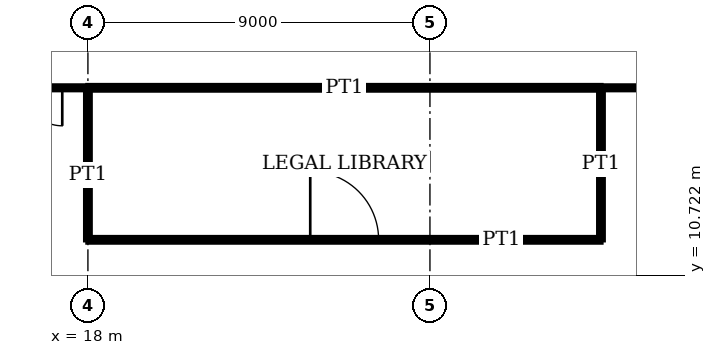
"""IFC4 building model, lengths in metres.
Left out: names, types, materials, properties, quantities, classifications, styles, units other than length and angle.
Written with IfcOpenShell. Run it as: python <this file> out.ifc"""

import sys

from ifc_helpers import new_model, si_unit, direction, frame, frame_2d, origin, place, context, subcontext, project, spatial, rectangle, extrude, element, fill, save


model = new_model("IFC4")
c1 = context("Model", 3, precision=1e-05, world=origin(), true_north=direction((0.0, 1.0)))
c2 = subcontext(c1, "Body", "Model", "MODEL_VIEW")
j1 = project(units=[si_unit("LENGTHUNIT", "METRE"), si_unit("PLANEANGLEUNIT", "RADIAN")], contexts=[c1])
p1 = place(None, origin())
s1 = spatial("IfcSite", under=j1, at=p1, CompositionType="ELEMENT")
p2 = place(p1, origin())
s2 = spatial("IfcBuilding", under=s1, at=p2, CompositionType="ELEMENT")
p3 = place(p2, frame((0.0, 0.0, 71.8)))
s3 = spatial("IfcBuildingStorey", under=s2, at=p3, CompositionType="ELEMENT", Elevation=71.8)
p4 = place(p3, frame((18.0, 11.65, 0.0), z_axis=(0.0, 0.0, 1.0), x_axis=(1.0, 0.0, 0.0)))
e1 = element("IfcWall", 1, at=p4, inside=s3, PredefinedType="PARTITIONING", context=c2, shape_type="SweptSolid", body=[
    extrude(rectangle(XDim=13.5, YDim=0.12, at=frame_2d((6.75, 0.0))), origin(), (0.0, 0.0, 1.0), 3.75),
])
p5 = place(p4, frame((5.85, 0.0, 0.0)))
e2 = element("IfcOpeningElement", 2, at=p5, cuts=e1, PredefinedType="OPENING", context=c2, shape_type="SweptSolid", body=[
    extrude(rectangle(XDim=1.8, YDim=2.4, at=frame_2d((0.9, 1.2))), frame((0.0, 0.07, 0.0), z_axis=(0.0, -1.0, 0.0), x_axis=(1.0, 0.0, 0.0)), (0.0, 0.0, 1.0), 0.14),
])
p6 = place(p3, frame((18.0, 15.65, 0.0), z_axis=(0.0, 0.0, 1.0), x_axis=(1.0, 0.0, 0.0)))
e3 = element("IfcWall", 3, at=p6, inside=s3, PredefinedType="PARTITIONING", context=c2, shape_type="SweptSolid", body=[
    extrude(rectangle(XDim=13.5, YDim=0.12, at=frame_2d((6.75, 0.0))), origin(), (0.0, 0.0, 1.0), 3.75),
])
p7 = place(p3, frame((15.65, 15.65, 0.0), z_axis=(0.0, 0.0, 1.0), x_axis=(1.0, 0.0, 0.0)))
e4 = element("IfcWall", 4, at=p7, inside=s3, PredefinedType="PARTITIONING", context=c2, shape_type="SweptSolid", body=[
    extrude(rectangle(XDim=2.35, YDim=0.1, at=frame_2d((1.175, 0.0))), origin(), (0.0, 0.0, 1.0), 3.75),
])
p8 = place(p7, frame((0.675, 0.0, 0.0)))
e5 = element("IfcOpeningElement", 5, at=p8, cuts=e4, PredefinedType="OPENING", context=c2, shape_type="SweptSolid", body=[
    extrude(rectangle(XDim=1.0, YDim=2.4, at=frame_2d((0.5, 1.2))), frame((0.0, 0.06, 0.0), z_axis=(0.0, -1.0, 0.0), x_axis=(1.0, 0.0, 0.0)), (0.0, 0.0, 1.0), 0.12),
])
p9 = place(p3, frame((31.5, 15.65, 0.0), z_axis=(0.0, 0.0, 1.0), x_axis=(1.0, 0.0, 0.0)))
e6 = element("IfcWall", 6, at=p9, inside=s3, PredefinedType="PARTITIONING", context=c2, shape_type="SweptSolid", body=[
    extrude(rectangle(XDim=15.85, YDim=0.1, at=frame_2d((7.925, 0.0))), origin(), (0.0, 0.0, 1.0), 3.75),
])
p10 = place(p3, frame((18.0, 11.65, 0.0), z_axis=(0.0, 0.0, 1.0), x_axis=(0.0, 1.0, 0.0)))
e7 = element("IfcWall", 7, at=p10, inside=s3, PredefinedType="PARTITIONING", context=c2, shape_type="SweptSolid", body=[
    extrude(rectangle(XDim=4.0, YDim=0.12, at=frame_2d((2.0, 0.0))), origin(), (0.0, 0.0, 1.0), 3.05),
])
p11 = place(p3, frame((31.5, 11.65, 0.0), z_axis=(0.0, 0.0, 1.0), x_axis=(0.0, 1.0, 0.0)))
e8 = element("IfcWall", 8, at=p11, inside=s3, PredefinedType="PARTITIONING", context=c2, shape_type="SweptSolid", body=[
    extrude(rectangle(XDim=4.0, YDim=0.12, at=frame_2d((2.0, 0.0))), origin(), (0.0, 0.0, 1.0), 3.75),
])
p12 = place(p5, origin())
e9 = element("IfcDoor", 9, at=p12, inside=s3, OperationType="DOUBLE_DOOR_SINGLE_SWING", PredefinedType="DOOR", context=c2, shape_type="SweptSolid", body=[
    extrude(rectangle(XDim=1.8, YDim=2.4, at=frame_2d((0.9, 1.2))), frame((0.0, 0.025, 0.0), z_axis=(0.0, -1.0, 0.0), x_axis=(1.0, 0.0, 0.0)), (0.0, 0.0, 1.0), 0.05),
])
fill(e2, e9)
p13 = place(p8, origin())
e10 = element("IfcDoor", 10, at=p13, inside=s3, OperationType="SINGLE_SWING_RIGHT", PredefinedType="DOOR", context=c2, shape_type="SweptSolid", body=[
    extrude(rectangle(XDim=1.0, YDim=2.4, at=frame_2d((0.5, 1.2))), frame((0.0, 0.02, 0.0), z_axis=(0.0, -1.0, 0.0), x_axis=(1.0, 0.0, 0.0)), (0.0, 0.0, 1.0), 0.04),
])
fill(e5, e10)
save(model, sys.argv[1])
